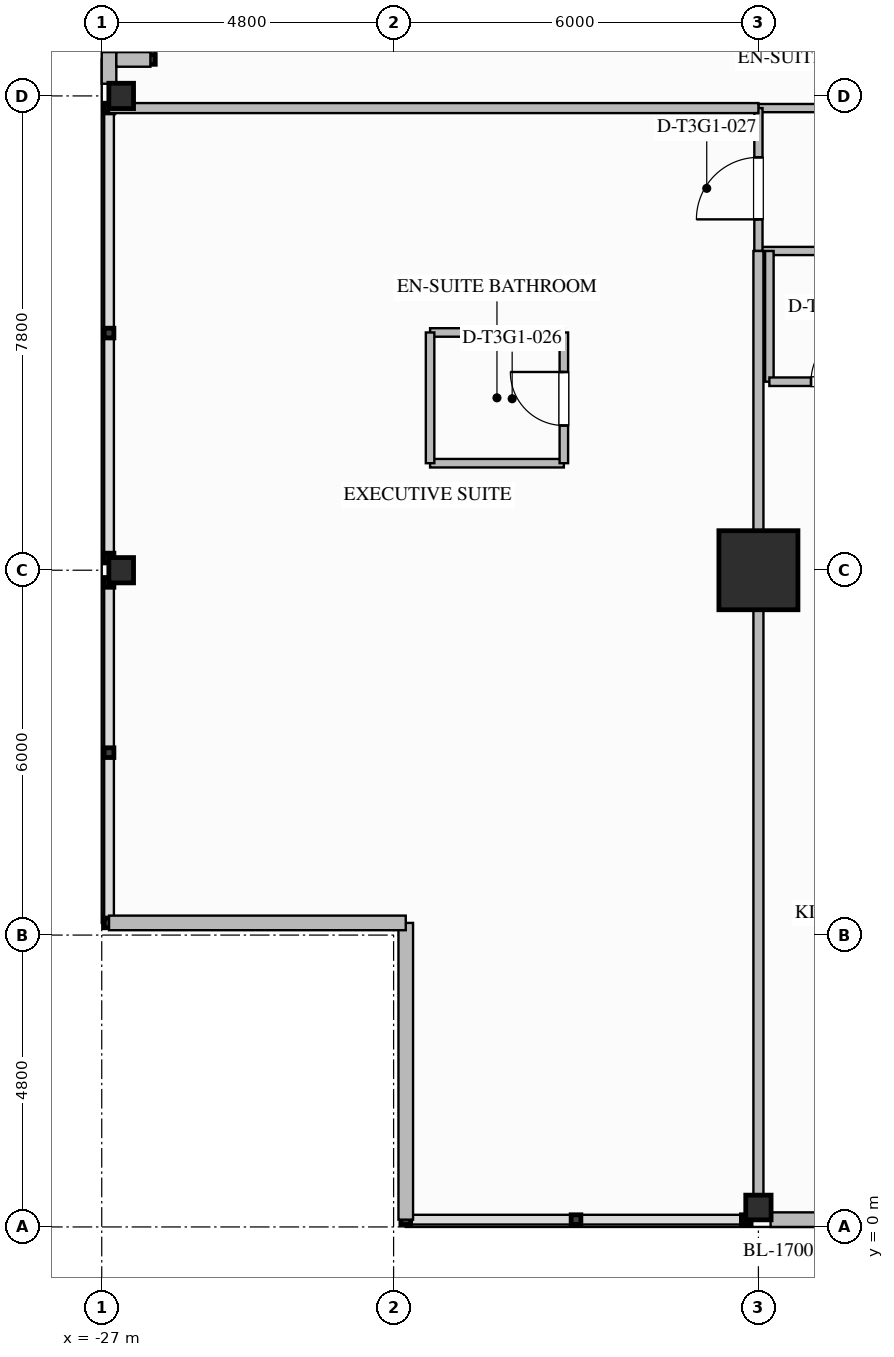
"""IFC4 building model, lengths in metres.
Left out: names, types, materials, properties, quantities, classifications, styles, units other than length and angle.
Written with IfcOpenShell. Run it as: python <this file> out.ifc"""

import sys

from ifc_helpers import new_model, si_unit, direction, frame, frame_2d, origin, origin_2d, place, context, subcontext, project, spatial, rectangle, i_section, extrude, element, fill, save


model = new_model("IFC4")
c1 = context("Model", 3, precision=1e-05, world=origin(), true_north=direction((0.0, 1.0)))
c2 = subcontext(c1, "Body", "Model", "MODEL_VIEW")
j1 = project(units=[si_unit("LENGTHUNIT", "METRE"), si_unit("PLANEANGLEUNIT", "RADIAN")], contexts=[c1])
p1 = place(None, origin())
s1 = spatial("IfcSite", under=j1, at=p1, CompositionType="ELEMENT")
p2 = place(p1, origin())
s2 = spatial("IfcBuilding", under=s1, at=p2, CompositionType="ELEMENT")
p3 = place(p2, frame((0.0, 0.0, 150.4)))
s3 = spatial("IfcBuildingStorey", under=s2, at=p3, CompositionType="ELEMENT", Elevation=150.4)
p4 = place(p3, frame((-16.2, 10.8, 0.0), z_axis=(0.0, 0.0, 1.0), x_axis=(1.0, 0.0, 0.0)))
e1 = element("IfcColumn", 1, at=p4, inside=s3, PredefinedType="COLUMN", context=c2, shape_type="SweptSolid", body=[
    extrude(rectangle(XDim=1.3, YDim=1.3, at=origin_2d()), origin(), (0.0, 0.0, 1.0), 3.55),
])
for number, where, z_axis, x_axis in (
    (2, (-26.68, 10.8, 0.0), (0.0, 0.0, 1.0), (1.0, 0.0, 0.0)),
    (3, (-26.68, 18.6, 0.0), (0.0, 0.0, 1.0), (1.0, 0.0, 0.0)),
    (4, (-16.2, 0.32, 0.0), (0.0, 0.0, 1.0), (0.0, 1.0, 0.0)),
):
    element("IfcColumn", number, at=place(p3, frame(where, z_axis=z_axis, x_axis=x_axis)), inside=s3, PredefinedType="COLUMN", context=c2, shape_type="SweptSolid", body=[
        extrude(i_section(OverallWidth=0.406, OverallDepth=0.416, WebThickness=0.03, FlangeThickness=0.048, FilletRadius=0.028, at=origin_2d()), origin(), (0.0, 0.0, 1.0), 3.547),
    ])
p5 = place(p3, frame((-26.88, 18.8, 0.0), z_axis=(0.0, 0.0, 1.0), x_axis=(0.0, 1.0, 0.0)))
e5 = element("IfcWall", 5, at=p5, inside=s3, PredefinedType="STANDARD", context=c2, shape_type="SweptSolid", body=[
    extrude(rectangle(XDim=0.52, YDim=0.24, at=frame_2d((0.26, 0.0))), origin(), (0.0, 0.0, 1.0), 3.29),
])
p6 = place(p3, frame((-8.6, 0.12, 0.0), z_axis=(0.0, 0.0, 1.0), x_axis=(-1.0, 0.0, 0.0)))
e6 = element("IfcWall", 6, at=p6, inside=s3, PredefinedType="STANDARD", context=c2, shape_type="SweptSolid", body=[
    extrude(rectangle(XDim=7.4, YDim=0.24, at=frame_2d((3.7, 0.0))), origin(), (0.0, 0.0, 1.0), 2.753),
])
p7 = place(p6, frame((1.8, 0.0, 0.0)))
e7 = element("IfcOpeningElement", 7, at=p7, cuts=e6, PredefinedType="OPENING", context=c2, shape_type="SweptSolid", body=[
    extrude(rectangle(XDim=1.0, YDim=2.2, at=frame_2d((0.5, 1.1))), frame((0.0, 0.13, 0.0), z_axis=(0.0, -1.0, 0.0), x_axis=(1.0, 0.0, 0.0)), (0.0, 0.0, 1.0), 0.26),
])
p8 = place(p6, frame((4.025, 0.0, 0.75)))
e8 = element("IfcOpeningElement", 8, at=p8, cuts=e6, PredefinedType="OPENING", context=c2, shape_type="SweptSolid", body=[
    extrude(rectangle(XDim=1.8, YDim=1.903, at=frame_2d((0.9, 0.952))), frame((0.0, 0.13, 0.0), z_axis=(0.0, -1.0, 0.0), x_axis=(1.0, 0.0, 0.0)), (0.0, 0.0, 1.0), 0.26),
])
for number, where, z_axis, x_axis in (
    (9, (-22.0, 0.12, 0.0), (0.0, 0.0, 1.0), (0.0, 1.0, 0.0)),
    (10, (-22.0, 5.0, 0.0), (0.0, 0.0, 1.0), (-1.0, 0.0, 0.0)),
):
    element("IfcWall", number, at=place(p3, frame(where, z_axis=z_axis, x_axis=x_axis)), inside=s3, PredefinedType="STANDARD", context=c2, shape_type="SweptSolid", body=[
        extrude(rectangle(XDim=4.88, YDim=0.24, at=frame_2d((2.44, 0.0))), origin(), (0.0, 0.0, 1.0), 3.29),
    ])
p9 = place(p3, frame((-26.76, 19.2, 0.0), z_axis=(0.0, 0.0, 1.0), x_axis=(1.0, 0.0, 0.0)))
e11 = element("IfcWall", 11, at=p9, inside=s3, PredefinedType="STANDARD", context=c2, shape_type="SweptSolid", body=[
    extrude(rectangle(XDim=0.56, YDim=0.24, at=frame_2d((0.28, 0.0))), origin(), (0.0, 0.0, 1.0), 3.29),
])
p10 = place(p3, frame((-16.2, 18.4, 0.0), z_axis=(0.0, 0.0, 1.0), x_axis=(1.0, 0.0, 0.0)))
e12 = element("IfcWall", 12, at=p10, inside=s3, PredefinedType="PARTITIONING", context=c2, shape_type="SweptSolid", body=[
    extrude(rectangle(XDim=5.5, YDim=0.135, at=frame_2d((2.75, 0.0))), origin(), (0.0, 0.0, 1.0), 2.667),
])
p11 = place(p3, frame((-16.2, 16.05, 0.0), z_axis=(0.0, 0.0, 1.0), x_axis=(1.0, 0.0, 0.0)))
e13 = element("IfcWall", 13, at=p11, inside=s3, PredefinedType="PARTITIONING", context=c2, shape_type="SweptSolid", body=[
    extrude(rectangle(XDim=24.8, YDim=0.135, at=frame_2d((12.4, 0.0))), origin(), (0.0, 0.0, 1.0), 3.29),
])
p12 = place(p11, frame((2.785, 0.0, 0.0)))
e14 = element("IfcOpeningElement", 14, at=p12, cuts=e13, PredefinedType="OPENING", context=c2, shape_type="SweptSolid", body=[
    extrude(rectangle(XDim=0.96, YDim=2.15, at=frame_2d((0.48, 1.075))), frame((0.0, 0.077, 0.0), z_axis=(0.0, -1.0, 0.0), x_axis=(1.0, 0.0, 0.0)), (0.0, 0.0, 1.0), 0.155),
])
p13 = place(p11, frame((7.595, 0.0, 0.0)))
e15 = element("IfcOpeningElement", 15, at=p13, cuts=e13, PredefinedType="OPENING", context=c2, shape_type="SweptSolid", body=[
    extrude(rectangle(XDim=1.26, YDim=2.2, at=frame_2d((0.63, 1.1))), frame((0.0, 0.077, 0.0), z_axis=(0.0, -1.0, 0.0), x_axis=(1.0, 0.0, 0.0)), (0.0, 0.0, 1.0), 0.155),
])
p14 = place(p11, frame((11.89, 0.0, 0.0)))
e16 = element("IfcOpeningElement", 16, at=p14, cuts=e13, PredefinedType="OPENING", context=c2, shape_type="SweptSolid", body=[
    extrude(rectangle(XDim=1.02, YDim=2.15, at=frame_2d((0.51, 1.075))), frame((0.0, 0.077, 0.0), z_axis=(0.0, -1.0, 0.0), x_axis=(1.0, 0.0, 0.0)), (0.0, 0.0, 1.0), 0.155),
])
p15 = place(p11, frame((18.17, 0.0, 0.0)))
e17 = element("IfcOpeningElement", 17, at=p15, cuts=e13, PredefinedType="OPENING", context=c2, shape_type="SweptSolid", body=[
    extrude(rectangle(XDim=1.26, YDim=2.2, at=frame_2d((0.63, 1.1))), frame((0.0, 0.077, 0.0), z_axis=(0.0, -1.0, 0.0), x_axis=(1.0, 0.0, 0.0)), (0.0, 0.0, 1.0), 0.155),
])
p16 = place(p11, frame((23.281, 0.0, 0.0)))
e18 = element("IfcOpeningElement", 18, at=p16, cuts=e13, PredefinedType="OPENING", context=c2, shape_type="SweptSolid", body=[
    extrude(rectangle(XDim=0.96, YDim=2.15, at=frame_2d((0.48, 1.075))), frame((0.0, 0.077, 0.0), z_axis=(0.0, -1.0, 0.0), x_axis=(1.0, 0.0, 0.0)), (0.0, 0.0, 1.0), 0.155),
])
p17 = place(p3, frame((-16.2, 16.05, 0.0), z_axis=(0.0, 0.0, 1.0), x_axis=(0.0, 1.0, 0.0)))
e19 = element("IfcWall", 19, at=p17, inside=s3, PredefinedType="PARTITIONING", context=c2, shape_type="SweptSolid", body=[
    extrude(rectangle(XDim=2.35, YDim=0.135, at=frame_2d((1.175, 0.0))), origin(), (0.0, 0.0, 1.0), 2.58),
])
p18 = place(p17, frame((0.52, 0.0, 0.0)))
e20 = element("IfcOpeningElement", 20, at=p18, cuts=e19, PredefinedType="OPENING", context=c2, shape_type="SweptSolid", body=[
    extrude(rectangle(XDim=1.02, YDim=2.15, at=frame_2d((0.51, 1.075))), frame((0.0, 0.077, 0.0), z_axis=(0.0, -1.0, 0.0), x_axis=(1.0, 0.0, 0.0)), (0.0, 0.0, 1.0), 0.155),
])
p19 = place(p3, frame((-16.2, 0.12, 0.0), z_axis=(0.0, 0.0, 1.0), x_axis=(0.0, 1.0, 0.0)))
e21 = element("IfcWall", 21, at=p19, inside=s3, PredefinedType="PARTITIONING", context=c2, shape_type="SweptSolid", body=[
    extrude(rectangle(XDim=15.93, YDim=0.165, at=frame_2d((7.965, 0.0))), origin(), (0.0, 0.0, 1.0), 2.58),
])
p20 = place(p3, frame((-26.88, 18.4, 0.0), z_axis=(0.0, 0.0, 1.0), x_axis=(1.0, 0.0, 0.0)))
e22 = element("IfcWall", 22, at=p20, inside=s3, PredefinedType="PARTITIONING", context=c2, shape_type="SweptSolid", body=[
    extrude(rectangle(XDim=10.68, YDim=0.165, at=frame_2d((5.34, 0.0))), origin(), (0.0, 0.0, 1.0), 2.58),
])
for number, where, z_axis, x_axis in (
    (23, (-21.6, 12.56, 0.0), (0.0, 0.0, 1.0), (1.0, 0.0, 0.0)),
    (24, (-21.6, 14.71, 0.0), (0.0, 0.0, 1.0), (1.0, 0.0, 0.0)),
):
    element("IfcWall", number, at=place(p3, frame(where, z_axis=z_axis, x_axis=x_axis)), inside=s3, PredefinedType="PLUMBINGWALL", context=c2, shape_type="SweptSolid", body=[
        extrude(rectangle(XDim=2.2, YDim=0.14, at=frame_2d((1.1, 0.0))), origin(), (0.0, 0.0, 1.0), 3.29),
    ])
p21 = place(p3, frame((-21.6, 12.56, 0.0), z_axis=(0.0, 0.0, 1.0), x_axis=(0.0, 1.0, 0.0)))
e25 = element("IfcWall", 25, at=p21, inside=s3, PredefinedType="PLUMBINGWALL", context=c2, shape_type="SweptSolid", body=[
    extrude(rectangle(XDim=2.15, YDim=0.14, at=frame_2d((1.075, 0.0))), origin(), (0.0, 0.0, 1.0), 3.29),
])
p22 = place(p3, frame((-19.4, 12.56, 0.0), z_axis=(0.0, 0.0, 1.0), x_axis=(0.0, 1.0, 0.0)))
e26 = element("IfcWall", 26, at=p22, inside=s3, PredefinedType="PLUMBINGWALL", context=c2, shape_type="SweptSolid", body=[
    extrude(rectangle(XDim=2.15, YDim=0.14, at=frame_2d((1.075, 0.0))), origin(), (0.0, 0.0, 1.0), 3.29),
])
p23 = place(p22, frame((0.62, 0.0, 0.0)))
e27 = element("IfcOpeningElement", 27, at=p23, cuts=e26, PredefinedType="OPENING", context=c2, shape_type="SweptSolid", body=[
    extrude(rectangle(XDim=0.88, YDim=2.1, at=frame_2d((0.44, 1.05))), frame((0.0, 0.08, 0.0), z_axis=(0.0, -1.0, 0.0), x_axis=(1.0, 0.0, 0.0)), (0.0, 0.0, 1.0), 0.16),
])
p24 = place(p3, frame((-16.02, 16.05, 0.0), z_axis=(0.0, 0.0, 1.0), x_axis=(0.0, -1.0, 0.0)))
e28 = element("IfcWall", 28, at=p24, inside=s3, PredefinedType="PLUMBINGWALL", context=c2, shape_type="SweptSolid", body=[
    extrude(rectangle(XDim=2.15, YDim=0.14, at=frame_2d((1.075, 0.0))), origin(), (0.0, 0.0, 1.0), 2.58),
])
p25 = place(p3, frame((-16.02, 13.9, 0.0), z_axis=(0.0, 0.0, 1.0), x_axis=(1.0, 0.0, 0.0)))
e29 = element("IfcWall", 29, at=p25, inside=s3, PredefinedType="PLUMBINGWALL", context=c2, shape_type="SweptSolid", body=[
    extrude(rectangle(XDim=2.25, YDim=0.14, at=frame_2d((1.125, 0.0))), origin(), (0.0, 0.0, 1.0), 3.29),
])
p26 = place(p25, frame((0.685, 0.0, 0.0)))
e30 = element("IfcOpeningElement", 30, at=p26, cuts=e29, PredefinedType="OPENING", context=c2, shape_type="SweptSolid", body=[
    extrude(rectangle(XDim=0.88, YDim=2.1, at=frame_2d((0.44, 1.05))), frame((0.0, 0.08, 0.0), z_axis=(0.0, -1.0, 0.0), x_axis=(1.0, 0.0, 0.0)), (0.0, 0.0, 1.0), 0.16),
])
p27 = place(p23, origin())
e31 = element("IfcDoor", 31, at=p27, inside=s3, OperationType="SINGLE_SWING_RIGHT", PredefinedType="DOOR", context=c2, shape_type="SweptSolid", body=[
    extrude(rectangle(XDim=0.88, YDim=2.1, at=frame_2d((0.44, 1.05))), frame((0.0, 0.025, 0.0), z_axis=(0.0, -1.0, 0.0), x_axis=(1.0, 0.0, 0.0)), (0.0, 0.0, 1.0), 0.05),
])
fill(e27, e31)
p28 = place(p18, origin())
e32 = element("IfcDoor", 32, at=p28, inside=s3, OperationType="SINGLE_SWING_LEFT", PredefinedType="DOOR", context=c2, shape_type="SweptSolid", body=[
    extrude(rectangle(XDim=1.02, YDim=2.15, at=frame_2d((0.51, 1.075))), frame((0.0, 0.025, 0.0), z_axis=(0.0, -1.0, 0.0), x_axis=(1.0, 0.0, 0.0)), (0.0, 0.0, 1.0), 0.05),
])
fill(e20, e32)
p29 = place(p26, origin())
e33 = element("IfcDoor", 33, at=p29, inside=s3, OperationType="SINGLE_SWING_RIGHT", PredefinedType="DOOR", context=c2, shape_type="SweptSolid", body=[
    extrude(rectangle(XDim=0.88, YDim=2.1, at=frame_2d((0.44, 1.05))), frame((0.0, 0.025, 0.0), z_axis=(0.0, -1.0, 0.0), x_axis=(1.0, 0.0, 0.0)), (0.0, 0.0, 1.0), 0.05),
])
fill(e30, e33)
save(model, sys.argv[1])
